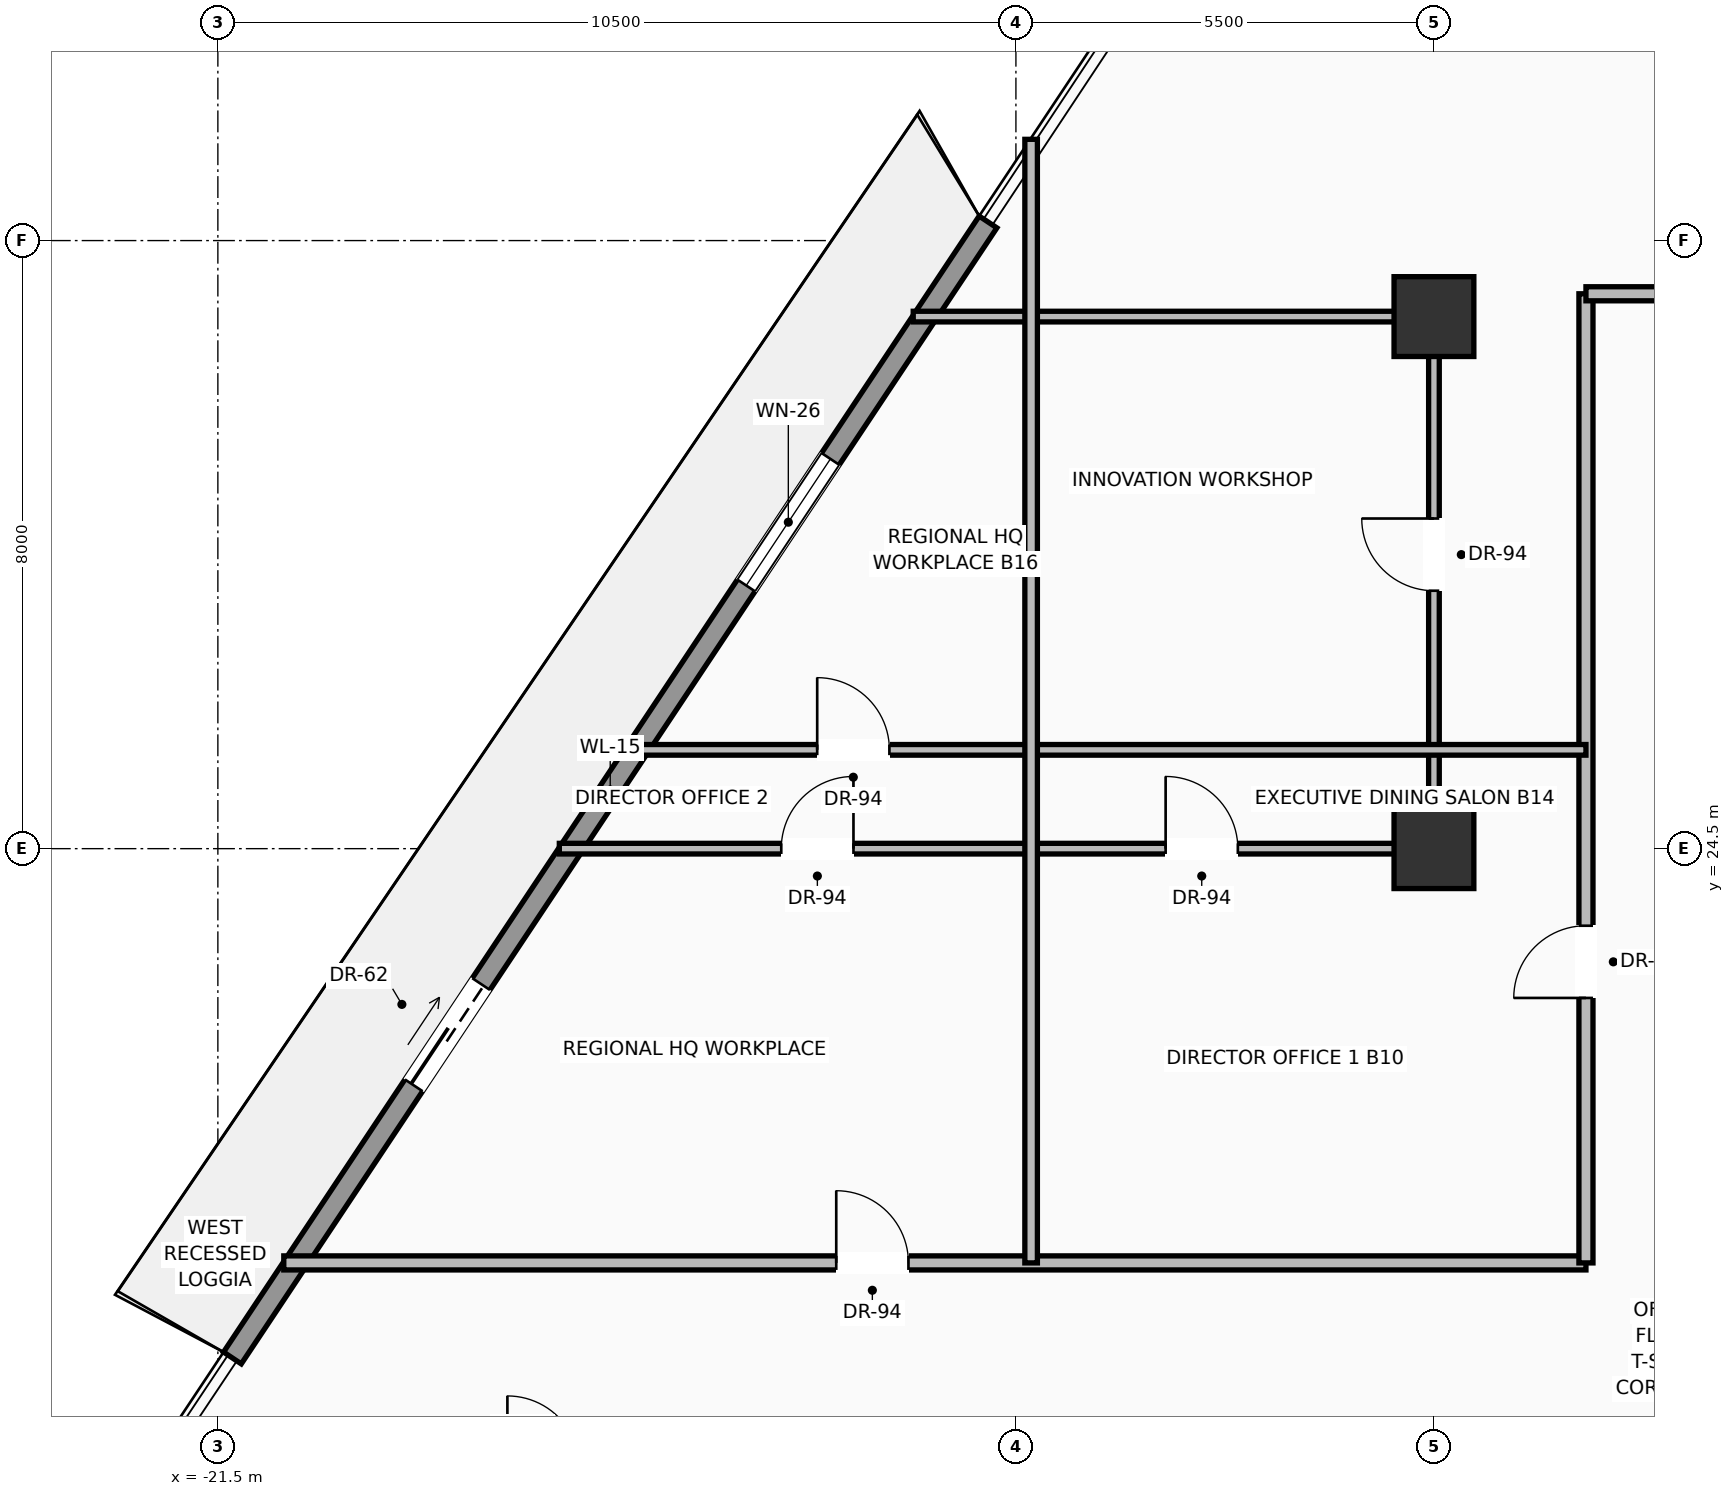
"""IFC4 building model, lengths in metres.
Left out: names, types, materials, properties, quantities, classifications, styles, units other than length and angle.
Written with IfcOpenShell. Run it as: python <this file> out.ifc"""

import sys

from ifc_helpers import new_model, si_unit, direction, frame, frame_2d, origin, origin_2d, place, context, subcontext, project, spatial, rectangle, extrude, source, transform, mapped, element, fill, save


model = new_model("IFC4")
c1 = context("Model", 3, precision=1e-05, world=origin(), true_north=direction((0.0, 1.0)))
c2 = subcontext(c1, "Body", "Model", "MODEL_VIEW")
j1 = project(units=[si_unit("LENGTHUNIT", "METRE"), si_unit("PLANEANGLEUNIT", "RADIAN")], contexts=[c1])
p1 = place(None, origin())
s1 = spatial("IfcSite", under=j1, at=p1, CompositionType="ELEMENT")
p2 = place(p1, origin())
s2 = spatial("IfcBuilding", under=s1, at=p2, CompositionType="ELEMENT")
p3 = place(p2, frame((0.0, 0.0, 113.6)))
s3 = spatial("IfcBuildingStorey", under=s2, at=p3, CompositionType="ELEMENT", Elevation=113.6)
m1 = source(origin(), c2, "Body", "SweptSolid", [
    extrude(rectangle(XDim=1.05, YDim=1.05, at=origin_2d()), origin(), (0.0, 0.0, 1.0), 3.7),
])
for number, where, z_axis, x_axis in (
    (1, (-5.5, 24.5, 0.0), (0.0, 0.0, 1.0), (1.0, 0.0, 0.0)),
    (2, (-5.5, 31.5, 0.0), (0.0, 0.0, 1.0), (1.0, 0.0, 0.0)),
):
    element("IfcColumn", number, at=place(p3, frame(where, z_axis=z_axis, x_axis=x_axis)), inside=s3, PredefinedType="COLUMN", context=c2, shape_type="MappedRepresentation", body=[
        mapped(m1, transform((0.0, 0.0, 0.0), scale=1.0)),
    ])
p4 = place(p3, frame((-21.309, 17.799, 0.0), z_axis=(0.0, 0.0, 1.0), x_axis=(0.553849316162, 0.83261691971, 0.0)))
e3 = element("IfcWall", 3, at=p4, inside=s3, PredefinedType="SOLIDWALL", context=c2, shape_type="SweptSolid", body=[
    extrude(rectangle(XDim=17.95, YDim=0.28, at=frame_2d((8.975, 0.0))), origin(), (0.0, 0.0, 1.0), 3.03),
])
p5 = place(p4, frame((4.308, 0.0, 0.0)))
e4 = element("IfcOpeningElement", 4, at=p5, cuts=e3, PredefinedType="OPENING", context=c2, shape_type="SweptSolid", body=[
    extrude(rectangle(XDim=1.6, YDim=2.35, at=frame_2d((0.8, 1.175))), frame((0.0, 0.15, 0.0), z_axis=(0.0, -1.0, 0.0), x_axis=(1.0, 0.0, 0.0)), (0.0, 0.0, 1.0), 0.3),
])
p6 = place(p4, frame((12.206, 0.0, 0.9)))
e5 = element("IfcOpeningElement", 5, at=p6, cuts=e3, PredefinedType="OPENING", context=c2, shape_type="SweptSolid", body=[
    extrude(rectangle(XDim=2.0, YDim=1.85, at=frame_2d((1.0, 0.925))), frame((0.0, 0.15, 0.0), z_axis=(0.0, -1.0, 0.0), x_axis=(1.0, 0.0, 0.0)), (0.0, 0.0, 1.0), 0.3),
])
p7 = place(p3, frame((-20.633, 19.05, 0.0), z_axis=(0.0, 0.0, 1.0), x_axis=(1.0, 0.0, 0.0)))
e6 = element("IfcWall", 6, at=p7, inside=s3, PredefinedType="PARTITIONING", context=c2, shape_type="SweptSolid", body=[
    extrude(rectangle(XDim=17.133, YDim=0.185, at=frame_2d((8.566, 0.0))), origin(), (0.0, 0.0, 1.0), 2.747),
])
p8 = place(p7, frame((7.269, 0.0, 0.0)))
e7 = element("IfcOpeningElement", 7, at=p8, cuts=e6, PredefinedType="OPENING", context=c2, shape_type="SweptSolid", body=[
    extrude(rectangle(XDim=0.95, YDim=2.2, at=frame_2d((0.475, 1.1))), frame((0.0, 0.103, 0.0), z_axis=(0.0, -1.0, 0.0), x_axis=(1.0, 0.0, 0.0)), (0.0, 0.0, 1.0), 0.205),
])
p9 = place(p3, frame((-3.5, 19.05, 0.0), z_axis=(0.0, 0.0, 1.0), x_axis=(0.0, 1.0, 0.0)))
e8 = element("IfcWall", 8, at=p9, inside=s3, PredefinedType="PARTITIONING", context=c2, shape_type="SweptSolid", body=[
    extrude(rectangle(XDim=12.75, YDim=0.185, at=frame_2d((6.375, 0.0))), origin(), (0.0, 0.0, 1.0), 2.747),
])
p10 = place(p9, frame((3.486, 0.0, 0.0)))
e9 = element("IfcOpeningElement", 9, at=p10, cuts=e8, PredefinedType="OPENING", context=c2, shape_type="SweptSolid", body=[
    extrude(rectangle(XDim=0.95, YDim=2.2, at=frame_2d((0.475, 1.1))), frame((0.0, 0.103, 0.0), z_axis=(0.0, -1.0, 0.0), x_axis=(1.0, 0.0, 0.0)), (0.0, 0.0, 1.0), 0.205),
])
p11 = place(p3, frame((-3.5, 31.8, 0.0), z_axis=(0.0, 0.0, 1.0), x_axis=(1.0, 0.0, 0.0)))
e10 = element("IfcWall", 10, at=p11, inside=s3, PredefinedType="PARTITIONING", context=c2, shape_type="SweptSolid", body=[
    extrude(rectangle(XDim=2.1, YDim=0.185, at=frame_2d((1.05, 0.0))), origin(), (0.0, 0.0, 1.0), 2.747),
])
p12 = place(p3, frame((-17.008, 24.5, 0.0), z_axis=(0.0, 0.0, 1.0), x_axis=(1.0, 0.0, 0.0)))
e11 = element("IfcWall", 11, at=p12, inside=s3, PredefinedType="PARTITIONING", context=c2, shape_type="SweptSolid", body=[
    extrude(rectangle(XDim=11.508, YDim=0.14, at=frame_2d((5.754, 0.0))), origin(), (0.0, 0.0, 1.0), 2.747),
])
p13 = place(p12, frame((2.92, 0.0, 0.0)))
e12 = element("IfcOpeningElement", 12, at=p13, cuts=e11, PredefinedType="OPENING", context=c2, shape_type="SweptSolid", body=[
    extrude(rectangle(XDim=0.95, YDim=2.2, at=frame_2d((0.475, 1.1))), frame((0.0, 0.08, 0.0), z_axis=(0.0, -1.0, 0.0), x_axis=(1.0, 0.0, 0.0)), (0.0, 0.0, 1.0), 0.16),
])
p14 = place(p12, frame((7.977, 0.0, 0.0)))
e13 = element("IfcOpeningElement", 13, at=p14, cuts=e11, PredefinedType="OPENING", context=c2, shape_type="SweptSolid", body=[
    extrude(rectangle(XDim=0.95, YDim=2.2, at=frame_2d((0.475, 1.1))), frame((0.0, 0.08, 0.0), z_axis=(0.0, -1.0, 0.0), x_axis=(1.0, 0.0, 0.0)), (0.0, 0.0, 1.0), 0.16),
])
p15 = place(p3, frame((-5.5, 24.5, 0.0), z_axis=(0.0, 0.0, 1.0), x_axis=(0.0, 1.0, 0.0)))
e14 = element("IfcWall", 14, at=p15, inside=s3, PredefinedType="PARTITIONING", context=c2, shape_type="SweptSolid", body=[
    extrude(rectangle(XDim=7.0, YDim=0.14, at=frame_2d((3.5, 0.0))), origin(), (0.0, 0.0, 1.0), 2.747),
])
p16 = place(p15, frame((3.393, 0.0, 0.0)))
e15 = element("IfcOpeningElement", 15, at=p16, cuts=e14, PredefinedType="OPENING", context=c2, shape_type="SweptSolid", body=[
    extrude(rectangle(XDim=0.95, YDim=2.2, at=frame_2d((0.475, 1.1))), frame((0.0, 0.08, 0.0), z_axis=(0.0, -1.0, 0.0), x_axis=(1.0, 0.0, 0.0)), (0.0, 0.0, 1.0), 0.16),
])
p17 = place(p3, frame((-12.351, 31.5, 0.0), z_axis=(0.0, 0.0, 1.0), x_axis=(1.0, 0.0, 0.0)))
e16 = element("IfcWall", 16, at=p17, inside=s3, PredefinedType="PARTITIONING", context=c2, shape_type="SweptSolid", body=[
    extrude(rectangle(XDim=6.851, YDim=0.14, at=frame_2d((3.426, 0.0))), origin(), (0.0, 0.0, 1.0), 2.747),
])
p18 = place(p3, frame((-16.143, 25.8, 0.0), z_axis=(0.0, 0.0, 1.0), x_axis=(1.0, 0.0, 0.0)))
e17 = element("IfcWall", 17, at=p18, inside=s3, PredefinedType="PARTITIONING", context=c2, shape_type="SweptSolid", body=[
    extrude(rectangle(XDim=12.643, YDim=0.14, at=frame_2d((6.321, 0.0))), origin(), (0.0, 0.0, 1.0), 2.747),
])
p19 = place(p18, frame((2.528, 0.0, 0.0)))
e18 = element("IfcOpeningElement", 18, at=p19, cuts=e17, PredefinedType="OPENING", context=c2, shape_type="SweptSolid", body=[
    extrude(rectangle(XDim=0.95, YDim=2.2, at=frame_2d((0.475, 1.1))), frame((0.0, 0.08, 0.0), z_axis=(0.0, -1.0, 0.0), x_axis=(1.0, 0.0, 0.0)), (0.0, 0.0, 1.0), 0.16),
])
p20 = place(p3, frame((-10.8, 19.05, 0.0), z_axis=(0.0, 0.0, 1.0), x_axis=(0.0, 1.0, 0.0)))
e19 = element("IfcWall", 19, at=p20, inside=s3, PredefinedType="PARTITIONING", context=c2, shape_type="SweptSolid", body=[
    extrude(rectangle(XDim=14.782, YDim=0.165, at=frame_2d((7.391, 0.0))), origin(), (0.0, 0.0, 1.0), 2.747),
])
m2 = source(origin(), c2, "Body", "SweptSolid", [
    extrude(rectangle(XDim=1.6, YDim=2.35, at=frame_2d((0.8, 1.175))), frame((0.0, 0.025, 0.0), z_axis=(0.0, -1.0, 0.0), x_axis=(1.0, 0.0, 0.0)), (0.0, 0.0, 1.0), 0.05),
])
p21 = place(p5, origin())
e20 = element("IfcDoor", 20, at=p21, inside=s3, OperationType="SLIDING_TO_LEFT", PredefinedType="DOOR", context=c2, shape_type="MappedRepresentation", body=[
    mapped(m2, transform((0.0, 0.0, 0.0), scale=1.0)),
])
fill(e4, e20)
m3 = source(origin(), c2, "Body", "SweptSolid", [
    extrude(rectangle(XDim=2.0, YDim=1.85, at=frame_2d((1.0, 0.925))), frame((0.0, 0.03, 0.0), z_axis=(0.0, -1.0, 0.0), x_axis=(1.0, 0.0, 0.0)), (0.0, 0.0, 1.0), 0.06),
])
p22 = place(p6, origin())
e21 = element("IfcWindow", 21, at=p22, inside=s3, PartitioningType="SINGLE_PANEL", PredefinedType="WINDOW", context=c2, shape_type="MappedRepresentation", body=[
    mapped(m3, transform((0.0, 0.0, 0.0), scale=1.0)),
])
fill(e5, e21)
m4 = source(origin(), c2, "Body", "SweptSolid", [
    extrude(rectangle(XDim=0.95, YDim=2.2, at=frame_2d((0.475, 1.1))), frame((0.0, 0.025, 0.0), z_axis=(0.0, -1.0, 0.0), x_axis=(1.0, 0.0, 0.0)), (0.0, 0.0, 1.0), 0.05),
])
p23 = place(p8, origin())
e22 = element("IfcDoor", 22, at=p23, inside=s3, OperationType="SINGLE_SWING_LEFT", PredefinedType="DOOR", context=c2, shape_type="MappedRepresentation", body=[
    mapped(m4, transform((0.0, 0.0, 0.0), scale=1.0)),
])
fill(e7, e22)
p24 = place(p10, origin())
e23 = element("IfcDoor", 23, at=p24, inside=s3, OperationType="SINGLE_SWING_LEFT", PredefinedType="DOOR", context=c2, shape_type="MappedRepresentation", body=[
    mapped(m4, transform((0.0, 0.0, 0.0), scale=1.0)),
])
fill(e9, e23)
p25 = place(p13, origin())
e24 = element("IfcDoor", 24, at=p25, inside=s3, OperationType="SINGLE_SWING_RIGHT", PredefinedType="DOOR", context=c2, shape_type="MappedRepresentation", body=[
    mapped(m4, transform((0.0, 0.0, 0.0), scale=1.0)),
])
fill(e12, e24)
p26 = place(p14, origin())
e25 = element("IfcDoor", 25, at=p26, inside=s3, OperationType="SINGLE_SWING_LEFT", PredefinedType="DOOR", context=c2, shape_type="MappedRepresentation", body=[
    mapped(m4, transform((0.0, 0.0, 0.0), scale=1.0)),
])
fill(e13, e25)
p27 = place(p16, origin())
e26 = element("IfcDoor", 26, at=p27, inside=s3, OperationType="SINGLE_SWING_RIGHT", PredefinedType="DOOR", context=c2, shape_type="MappedRepresentation", body=[
    mapped(m4, transform((0.0, 0.0, 0.0), scale=1.0)),
])
fill(e15, e26)
p28 = place(p19, origin())
e27 = element("IfcDoor", 27, at=p28, inside=s3, OperationType="SINGLE_SWING_LEFT", PredefinedType="DOOR", context=c2, shape_type="MappedRepresentation", body=[
    mapped(m4, transform((0.0, 0.0, 0.0), scale=1.0)),
])
fill(e18, e27)
save(model, sys.argv[1])
